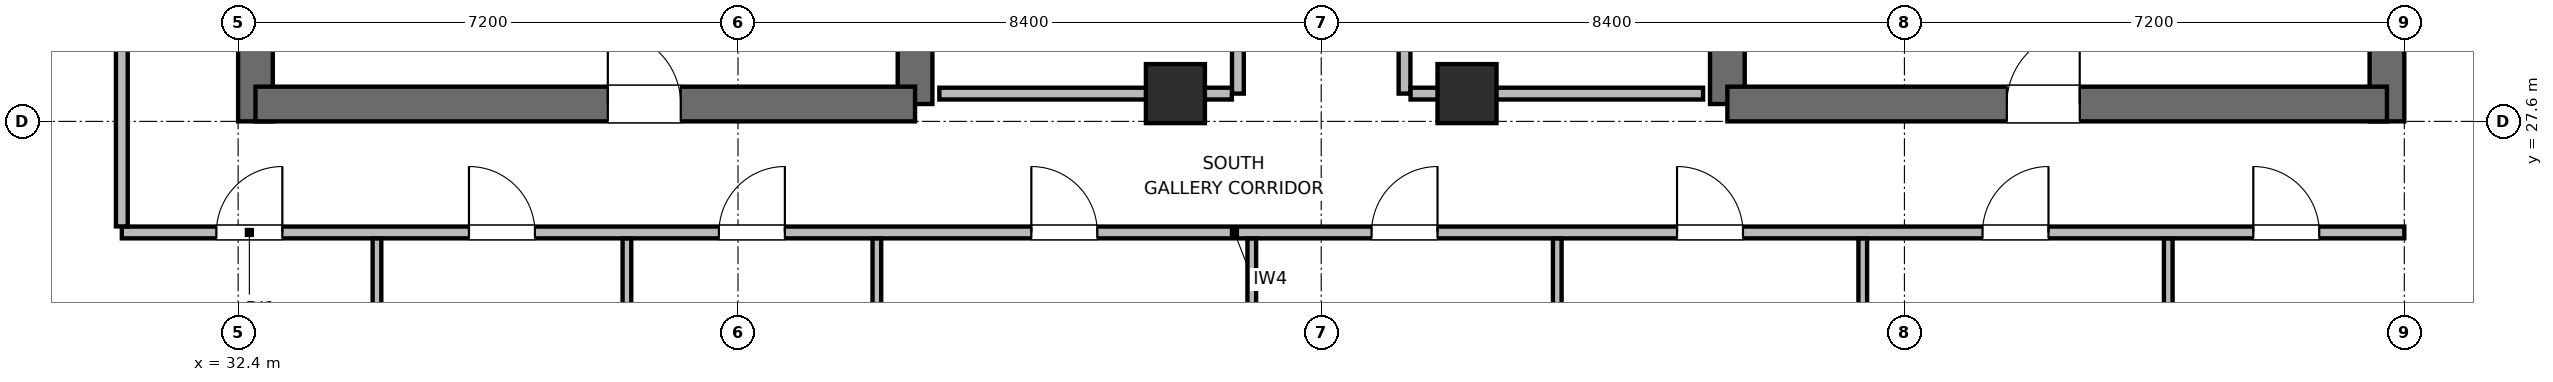
"""IFC4 building model, lengths in metres.
Left out: names, types, materials, properties, quantities, classifications, styles, units other than length and angle.
Written with IfcOpenShell. Run it as: python <this file> out.ifc"""

import sys

from ifc_helpers import new_model, si_unit, direction, frame, frame_2d, origin, origin_2d, place, context, subcontext, project, spatial, rectangle, extrude, element, fill, save


model = new_model("IFC4")
c1 = context("Model", 3, precision=1e-05, world=origin(), true_north=direction((0.0, 1.0)))
c2 = subcontext(c1, "Body", "Model", "MODEL_VIEW")
j1 = project(units=[si_unit("LENGTHUNIT", "METRE"), si_unit("PLANEANGLEUNIT", "RADIAN")], contexts=[c1])
p1 = place(None, origin())
s1 = spatial("IfcSite", under=j1, at=p1, CompositionType="ELEMENT")
p2 = place(p1, origin())
s2 = spatial("IfcBuilding", under=s1, at=p2, CompositionType="ELEMENT")
p3 = place(p2, frame((0.0, 0.0, 302.4)))
s3 = spatial("IfcBuildingStorey", under=s2, at=p3, CompositionType="ELEMENT", Elevation=302.4)
p4 = place(p3, frame((32.65, 27.6, 0.0), z_axis=(0.0, 0.0, 1.0), x_axis=(0.0, 1.0, 0.0)))
e1 = element("IfcWall", 1, at=p4, inside=s3, PredefinedType="SHEAR", context=c2, shape_type="SweptSolid", body=[
    extrude(rectangle(XDim=16.8, YDim=0.5, at=frame_2d((8.4, 0.0))), origin(), (0.0, 0.0, 1.0), 3.9),
])
p5 = place(p3, frame((42.15, 27.85, 0.0), z_axis=(0.0, 0.0, 1.0), x_axis=(0.0, 1.0, 0.0)))
e2 = element("IfcWall", 2, at=p5, inside=s3, PredefinedType="SHEAR", context=c2, shape_type="SweptSolid", body=[
    extrude(rectangle(XDim=6.55, YDim=0.5, at=frame_2d((3.275, 0.0))), origin(), (0.0, 0.0, 1.0), 3.9),
])
p6 = place(p3, frame((32.65, 27.85, 0.0), z_axis=(0.0, 0.0, 1.0), x_axis=(1.0, 0.0, 0.0)))
e3 = element("IfcWall", 3, at=p6, inside=s3, PredefinedType="SHEAR", context=c2, shape_type="SweptSolid", body=[
    extrude(rectangle(XDim=9.5, YDim=0.5, at=frame_2d((4.75, 0.0))), origin(), (0.0, 0.0, 1.0), 3.9),
])
p7 = place(p6, frame((5.075, 0.0, 0.0)))
e4 = element("IfcOpeningElement", 4, at=p7, cuts=e3, PredefinedType="OPENING", context=c2, shape_type="SweptSolid", body=[
    extrude(rectangle(XDim=1.05, YDim=2.04, at=frame_2d((0.525, 1.02))), frame((0.0, 0.26, 0.0), z_axis=(0.0, -1.0, 0.0), x_axis=(1.0, 0.0, 0.0)), (0.0, 0.0, 1.0), 0.52),
])
p8 = place(p3, frame((53.85, 27.85, 0.0), z_axis=(0.0, 0.0, 1.0), x_axis=(0.0, 1.0, 0.0)))
e5 = element("IfcWall", 5, at=p8, inside=s3, PredefinedType="SHEAR", context=c2, shape_type="SweptSolid", body=[
    extrude(rectangle(XDim=7.95, YDim=0.5, at=frame_2d((3.975, 0.0))), origin(), (0.0, 0.0, 1.0), 3.9),
])
p9 = place(p3, frame((63.35, 27.6, 0.0), z_axis=(0.0, 0.0, 1.0), x_axis=(0.0, 1.0, 0.0)))
e6 = element("IfcWall", 6, at=p9, inside=s3, PredefinedType="SHEAR", context=c2, shape_type="SweptSolid", body=[
    extrude(rectangle(XDim=16.8, YDim=0.5, at=frame_2d((8.4, 0.0))), origin(), (0.0, 0.0, 1.0), 3.9),
])
p10 = place(p3, frame((53.85, 27.85, 0.0), z_axis=(0.0, 0.0, 1.0), x_axis=(1.0, 0.0, 0.0)))
e7 = element("IfcWall", 7, at=p10, inside=s3, PredefinedType="SHEAR", context=c2, shape_type="SweptSolid", body=[
    extrude(rectangle(XDim=9.5, YDim=0.5, at=frame_2d((4.75, 0.0))), origin(), (0.0, 0.0, 1.0), 3.9),
])
p11 = place(p10, frame((4.025, 0.0, 0.0)))
e8 = element("IfcOpeningElement", 8, at=p11, cuts=e7, PredefinedType="OPENING", context=c2, shape_type="SweptSolid", body=[
    extrude(rectangle(XDim=1.05, YDim=2.04, at=frame_2d((0.525, 1.02))), frame((0.0, 0.26, 0.0), z_axis=(0.0, -1.0, 0.0), x_axis=(1.0, 0.0, 0.0)), (0.0, 0.0, 1.0), 0.52),
])
for number, where, z_axis, x_axis in (
    (9, (45.9, 28.0, 0.0), (0.0, 0.0, 1.0), (1.0, 0.0, 0.0)),
    (10, (50.1, 28.0, 0.0), (0.0, 0.0, 1.0), (1.0, 0.0, 0.0)),
):
    element("IfcColumn", number, at=place(p3, frame(where, z_axis=z_axis, x_axis=x_axis)), inside=s3, PredefinedType="COLUMN", context=c2, shape_type="SweptSolid", body=[
        extrude(rectangle(XDim=0.85, YDim=0.85, at=origin_2d()), origin(), (0.0, 0.0, 1.0), 3.9),
    ])
p12 = place(p3, frame((46.8, 28.0, 0.0), z_axis=(0.0, 0.0, 1.0), x_axis=(0.0, 1.0, 0.0)))
e11 = element("IfcWall", 11, at=p12, inside=s3, PredefinedType="PARTITIONING", context=c2, shape_type="SweptSolid", body=[
    extrude(rectangle(XDim=4.5, YDim=0.17, at=frame_2d((2.25, 0.0))), origin(), (0.0, 0.0, 1.0), 3.68),
])
p13 = place(p12, frame((0.675, 0.0, 0.0)))
e12 = element("IfcOpeningElement", 12, at=p13, cuts=e11, PredefinedType="OPENING", context=c2, shape_type="SweptSolid", body=[
    extrude(rectangle(XDim=0.9, YDim=2.02, at=frame_2d((0.45, 1.01))), frame((0.0, 0.095, 0.0), z_axis=(0.0, -1.0, 0.0), x_axis=(1.0, 0.0, 0.0)), (0.0, 0.0, 1.0), 0.19),
])
p14 = place(p12, frame((2.925, 0.0, 0.0)))
e13 = element("IfcOpeningElement", 13, at=p14, cuts=e11, PredefinedType="OPENING", context=c2, shape_type="SweptSolid", body=[
    extrude(rectangle(XDim=0.9, YDim=2.02, at=frame_2d((0.45, 1.01))), frame((0.0, 0.095, 0.0), z_axis=(0.0, -1.0, 0.0), x_axis=(1.0, 0.0, 0.0)), (0.0, 0.0, 1.0), 0.19),
])
p15 = place(p3, frame((42.5, 28.0, 0.0), z_axis=(0.0, 0.0, 1.0), x_axis=(1.0, 0.0, 0.0)))
e14 = element("IfcWall", 14, at=p15, inside=s3, PredefinedType="PARTITIONING", context=c2, shape_type="SweptSolid", body=[
    extrude(rectangle(XDim=4.213, YDim=0.17, at=frame_2d((2.106, 0.0))), origin(), (0.0, 0.0, 1.0), 2.765),
])
p16 = place(p3, frame((49.2, 28.0, 0.0), z_axis=(0.0, 0.0, 1.0), x_axis=(0.0, 1.0, 0.0)))
e15 = element("IfcWall", 15, at=p16, inside=s3, PredefinedType="PARTITIONING", context=c2, shape_type="SweptSolid", body=[
    extrude(rectangle(XDim=4.5, YDim=0.17, at=frame_2d((2.25, 0.0))), origin(), (0.0, 0.0, 1.0), 3.68),
])
p17 = place(p16, frame((1.8, 0.0, 0.0)))
e16 = element("IfcOpeningElement", 16, at=p17, cuts=e15, PredefinedType="OPENING", context=c2, shape_type="SweptSolid", body=[
    extrude(rectangle(XDim=0.9, YDim=2.02, at=frame_2d((0.45, 1.01))), frame((0.0, 0.095, 0.0), z_axis=(0.0, -1.0, 0.0), x_axis=(1.0, 0.0, 0.0)), (0.0, 0.0, 1.0), 0.19),
])
p18 = place(p3, frame((49.287, 28.0, 0.0), z_axis=(0.0, 0.0, 1.0), x_axis=(1.0, 0.0, 0.0)))
e17 = element("IfcWall", 17, at=p18, inside=s3, PredefinedType="PARTITIONING", context=c2, shape_type="SweptSolid", body=[
    extrude(rectangle(XDim=4.213, YDim=0.17, at=frame_2d((2.106, 0.0))), origin(), (0.0, 0.0, 1.0), 2.765),
])
p19 = place(p3, frame((30.725, 26.0, 0.0), z_axis=(0.0, 0.0, 1.0), x_axis=(1.0, 0.0, 0.0)))
e18 = element("IfcWall", 18, at=p19, inside=s3, PredefinedType="PARTITIONING", context=c2, shape_type="SweptSolid", body=[
    extrude(rectangle(XDim=32.875, YDim=0.17, at=frame_2d((16.438, 0.0))), origin(), (0.0, 0.0, 1.0), 3.68),
])
p20 = place(p19, frame((1.362, 0.0, 0.0)))
e19 = element("IfcOpeningElement", 19, at=p20, cuts=e18, PredefinedType="OPENING", context=c2, shape_type="SweptSolid", body=[
    extrude(rectangle(XDim=0.95, YDim=2.04, at=frame_2d((0.475, 1.02))), frame((0.0, 0.095, 0.0), z_axis=(0.0, -1.0, 0.0), x_axis=(1.0, 0.0, 0.0)), (0.0, 0.0, 1.0), 0.19),
])
p21 = place(p19, frame((5.0, 0.0, 0.0)))
e20 = element("IfcOpeningElement", 20, at=p21, cuts=e18, PredefinedType="OPENING", context=c2, shape_type="SweptSolid", body=[
    extrude(rectangle(XDim=0.95, YDim=2.04, at=frame_2d((0.475, 1.02))), frame((0.0, 0.095, 0.0), z_axis=(0.0, -1.0, 0.0), x_axis=(1.0, 0.0, 0.0)), (0.0, 0.0, 1.0), 0.19),
])
p22 = place(p19, frame((8.6, 0.0, 0.0)))
e21 = element("IfcOpeningElement", 21, at=p22, cuts=e18, PredefinedType="OPENING", context=c2, shape_type="SweptSolid", body=[
    extrude(rectangle(XDim=0.95, YDim=2.04, at=frame_2d((0.475, 1.02))), frame((0.0, 0.095, 0.0), z_axis=(0.0, -1.0, 0.0), x_axis=(1.0, 0.0, 0.0)), (0.0, 0.0, 1.0), 0.19),
])
p23 = place(p19, frame((13.1, 0.0, 0.0)))
e22 = element("IfcOpeningElement", 22, at=p23, cuts=e18, PredefinedType="OPENING", context=c2, shape_type="SweptSolid", body=[
    extrude(rectangle(XDim=0.95, YDim=2.04, at=frame_2d((0.475, 1.02))), frame((0.0, 0.095, 0.0), z_axis=(0.0, -1.0, 0.0), x_axis=(1.0, 0.0, 0.0)), (0.0, 0.0, 1.0), 0.19),
])
p24 = place(p19, frame((18.0, 0.0, 0.0)))
e23 = element("IfcOpeningElement", 23, at=p24, cuts=e18, PredefinedType="OPENING", context=c2, shape_type="SweptSolid", body=[
    extrude(rectangle(XDim=0.95, YDim=2.04, at=frame_2d((0.475, 1.02))), frame((0.0, 0.095, 0.0), z_axis=(0.0, -1.0, 0.0), x_axis=(1.0, 0.0, 0.0)), (0.0, 0.0, 1.0), 0.19),
])
p25 = place(p19, frame((22.4, 0.0, 0.0)))
e24 = element("IfcOpeningElement", 24, at=p25, cuts=e18, PredefinedType="OPENING", context=c2, shape_type="SweptSolid", body=[
    extrude(rectangle(XDim=0.95, YDim=2.04, at=frame_2d((0.475, 1.02))), frame((0.0, 0.095, 0.0), z_axis=(0.0, -1.0, 0.0), x_axis=(1.0, 0.0, 0.0)), (0.0, 0.0, 1.0), 0.19),
])
p26 = place(p19, frame((26.8, 0.0, 0.0)))
e25 = element("IfcOpeningElement", 25, at=p26, cuts=e18, PredefinedType="OPENING", context=c2, shape_type="SweptSolid", body=[
    extrude(rectangle(XDim=0.95, YDim=2.04, at=frame_2d((0.475, 1.02))), frame((0.0, 0.095, 0.0), z_axis=(0.0, -1.0, 0.0), x_axis=(1.0, 0.0, 0.0)), (0.0, 0.0, 1.0), 0.19),
])
p27 = place(p19, frame((30.7, 0.0, 0.0)))
e26 = element("IfcOpeningElement", 26, at=p27, cuts=e18, PredefinedType="OPENING", context=c2, shape_type="SweptSolid", body=[
    extrude(rectangle(XDim=0.95, YDim=2.04, at=frame_2d((0.475, 1.02))), frame((0.0, 0.095, 0.0), z_axis=(0.0, -1.0, 0.0), x_axis=(1.0, 0.0, 0.0)), (0.0, 0.0, 1.0), 0.19),
])
p28 = place(p3, frame((30.725, 26.087, 0.0), z_axis=(0.0, 0.0, 1.0), x_axis=(0.0, 1.0, 0.0)))
e27 = element("IfcWall", 27, at=p28, inside=s3, PredefinedType="PARTITIONING", context=c2, shape_type="SweptSolid", body=[
    extrude(rectangle(XDim=19.826, YDim=0.17, at=frame_2d((9.913, 0.0))), origin(), (0.0, 0.0, 1.0), 3.68),
])
p29 = place(p28, frame((3.138, 0.0, 0.0)))
e28 = element("IfcOpeningElement", 28, at=p29, cuts=e27, PredefinedType="OPENING", context=c2, shape_type="SweptSolid", body=[
    extrude(rectangle(XDim=0.95, YDim=2.04, at=frame_2d((0.475, 1.02))), frame((0.0, 0.095, 0.0), z_axis=(0.0, -1.0, 0.0), x_axis=(1.0, 0.0, 0.0)), (0.0, 0.0, 1.0), 0.19),
])
p30 = place(p28, frame((10.038, 0.0, 0.0)))
e29 = element("IfcOpeningElement", 29, at=p30, cuts=e27, PredefinedType="OPENING", context=c2, shape_type="SweptSolid", body=[
    extrude(rectangle(XDim=0.95, YDim=2.04, at=frame_2d((0.475, 1.02))), frame((0.0, 0.095, 0.0), z_axis=(0.0, -1.0, 0.0), x_axis=(1.0, 0.0, 0.0)), (0.0, 0.0, 1.0), 0.19),
])
p31 = place(p28, frame((16.338, 0.0, 0.0)))
e30 = element("IfcOpeningElement", 30, at=p31, cuts=e27, PredefinedType="OPENING", context=c2, shape_type="SweptSolid", body=[
    extrude(rectangle(XDim=0.95, YDim=2.04, at=frame_2d((0.475, 1.02))), frame((0.0, 0.095, 0.0), z_axis=(0.0, -1.0, 0.0), x_axis=(1.0, 0.0, 0.0)), (0.0, 0.0, 1.0), 0.19),
])
for number, where, z_axis, x_axis in (
    (31, (34.4, 18.875, 0.0), (0.0, 0.0, 1.0), (0.0, 1.0, 0.0)),
    (32, (38.0, 18.875, 0.0), (0.0, 0.0, 1.0), (0.0, 1.0, 0.0)),
):
    element("IfcWall", number, at=place(p3, frame(where, z_axis=z_axis, x_axis=x_axis)), inside=s3, PredefinedType="PARTITIONING", context=c2, shape_type="SweptSolid", body=[
        extrude(rectangle(XDim=7.038, YDim=0.125, at=frame_2d((3.519, 0.0))), origin(), (0.0, 0.0, 1.0), 3.68),
    ])
p32 = place(p3, frame((41.6, 18.998, 0.0), z_axis=(0.0, 0.0, 1.0), x_axis=(0.0, 1.0, 0.0)))
e33 = element("IfcWall", 33, at=p32, inside=s3, PredefinedType="PARTITIONING", context=c2, shape_type="SweptSolid", body=[
    extrude(rectangle(XDim=6.915, YDim=0.125, at=frame_2d((3.458, 0.0))), origin(), (0.0, 0.0, 1.0), 3.043),
])
p33 = place(p3, frame((47.0, 22.155, 0.0), z_axis=(0.0, 0.0, 1.0), x_axis=(0.0, 1.0, 0.0)))
e34 = element("IfcWall", 34, at=p33, inside=s3, PredefinedType="PARTITIONING", context=c2, shape_type="SweptSolid", body=[
    extrude(rectangle(XDim=3.758, YDim=0.125, at=frame_2d((1.879, 0.0))), origin(), (0.0, 0.0, 1.0), 3.68),
])
p34 = place(p3, frame((51.4, 20.075, 0.0), z_axis=(0.0, 0.0, 1.0), x_axis=(0.0, 1.0, 0.0)))
e35 = element("IfcWall", 35, at=p34, inside=s3, PredefinedType="PARTITIONING", context=c2, shape_type="SweptSolid", body=[
    extrude(rectangle(XDim=5.838, YDim=0.125, at=frame_2d((2.919, 0.0))), origin(), (0.0, 0.0, 1.0), 3.68),
])
p35 = place(p3, frame((55.8, 18.875, 0.0), z_axis=(0.0, 0.0, 1.0), x_axis=(0.0, 1.0, 0.0)))
e36 = element("IfcWall", 36, at=p35, inside=s3, PredefinedType="PARTITIONING", context=c2, shape_type="SweptSolid", body=[
    extrude(rectangle(XDim=7.038, YDim=0.125, at=frame_2d((3.519, 0.0))), origin(), (0.0, 0.0, 1.0), 3.043),
])
p36 = place(p3, frame((60.2, 18.875, 0.0), z_axis=(0.0, 0.0, 1.0), x_axis=(0.0, 1.0, 0.0)))
e37 = element("IfcWall", 37, at=p36, inside=s3, PredefinedType="PARTITIONING", context=c2, shape_type="SweptSolid", body=[
    extrude(rectangle(XDim=7.038, YDim=0.125, at=frame_2d((3.519, 0.0))), origin(), (0.0, 0.0, 1.0), 3.68),
])
p37 = place(p7, origin())
e38 = element("IfcDoor", 38, at=p37, inside=s3, OperationType="SINGLE_SWING_LEFT", PredefinedType="DOOR", context=c2, shape_type="SweptSolid", body=[
    extrude(rectangle(XDim=1.05, YDim=2.04, at=frame_2d((0.525, 1.02))), frame((0.0, 0.025, 0.0), z_axis=(0.0, -1.0, 0.0), x_axis=(1.0, 0.0, 0.0)), (0.0, 0.0, 1.0), 0.05),
])
fill(e4, e38)
p38 = place(p11, origin())
e39 = element("IfcDoor", 39, at=p38, inside=s3, OperationType="SINGLE_SWING_RIGHT", PredefinedType="DOOR", context=c2, shape_type="SweptSolid", body=[
    extrude(rectangle(XDim=1.05, YDim=2.04, at=frame_2d((0.525, 1.02))), frame((0.0, 0.025, 0.0), z_axis=(0.0, -1.0, 0.0), x_axis=(1.0, 0.0, 0.0)), (0.0, 0.0, 1.0), 0.05),
])
fill(e8, e39)
p39 = place(p20, origin())
e40 = element("IfcDoor", 40, at=p39, inside=s3, OperationType="SINGLE_SWING_RIGHT", PredefinedType="DOOR", context=c2, shape_type="SweptSolid", body=[
    extrude(rectangle(XDim=0.95, YDim=2.04, at=frame_2d((0.475, 1.02))), frame((0.0, 0.025, 0.0), z_axis=(0.0, -1.0, 0.0), x_axis=(1.0, 0.0, 0.0)), (0.0, 0.0, 1.0), 0.05),
])
fill(e19, e40)
p40 = place(p21, origin())
e41 = element("IfcDoor", 41, at=p40, inside=s3, OperationType="SINGLE_SWING_LEFT", PredefinedType="DOOR", context=c2, shape_type="SweptSolid", body=[
    extrude(rectangle(XDim=0.95, YDim=2.04, at=frame_2d((0.475, 1.02))), frame((0.0, 0.025, 0.0), z_axis=(0.0, -1.0, 0.0), x_axis=(1.0, 0.0, 0.0)), (0.0, 0.0, 1.0), 0.05),
])
fill(e20, e41)
p41 = place(p22, origin())
e42 = element("IfcDoor", 42, at=p41, inside=s3, OperationType="SINGLE_SWING_RIGHT", PredefinedType="DOOR", context=c2, shape_type="SweptSolid", body=[
    extrude(rectangle(XDim=0.95, YDim=2.04, at=frame_2d((0.475, 1.02))), frame((0.0, 0.025, 0.0), z_axis=(0.0, -1.0, 0.0), x_axis=(1.0, 0.0, 0.0)), (0.0, 0.0, 1.0), 0.05),
])
fill(e21, e42)
p42 = place(p23, origin())
e43 = element("IfcDoor", 43, at=p42, inside=s3, OperationType="SINGLE_SWING_LEFT", PredefinedType="DOOR", context=c2, shape_type="SweptSolid", body=[
    extrude(rectangle(XDim=0.95, YDim=2.04, at=frame_2d((0.475, 1.02))), frame((0.0, 0.025, 0.0), z_axis=(0.0, -1.0, 0.0), x_axis=(1.0, 0.0, 0.0)), (0.0, 0.0, 1.0), 0.05),
])
fill(e22, e43)
p43 = place(p24, origin())
e44 = element("IfcDoor", 44, at=p43, inside=s3, OperationType="SINGLE_SWING_RIGHT", PredefinedType="DOOR", context=c2, shape_type="SweptSolid", body=[
    extrude(rectangle(XDim=0.95, YDim=2.04, at=frame_2d((0.475, 1.02))), frame((0.0, 0.025, 0.0), z_axis=(0.0, -1.0, 0.0), x_axis=(1.0, 0.0, 0.0)), (0.0, 0.0, 1.0), 0.05),
])
fill(e23, e44)
p44 = place(p25, origin())
e45 = element("IfcDoor", 45, at=p44, inside=s3, OperationType="SINGLE_SWING_LEFT", PredefinedType="DOOR", context=c2, shape_type="SweptSolid", body=[
    extrude(rectangle(XDim=0.95, YDim=2.04, at=frame_2d((0.475, 1.02))), frame((0.0, 0.025, 0.0), z_axis=(0.0, -1.0, 0.0), x_axis=(1.0, 0.0, 0.0)), (0.0, 0.0, 1.0), 0.05),
])
fill(e24, e45)
p45 = place(p26, origin())
e46 = element("IfcDoor", 46, at=p45, inside=s3, OperationType="SINGLE_SWING_RIGHT", PredefinedType="DOOR", context=c2, shape_type="SweptSolid", body=[
    extrude(rectangle(XDim=0.95, YDim=2.04, at=frame_2d((0.475, 1.02))), frame((0.0, 0.025, 0.0), z_axis=(0.0, -1.0, 0.0), x_axis=(1.0, 0.0, 0.0)), (0.0, 0.0, 1.0), 0.05),
])
fill(e25, e46)
p46 = place(p27, origin())
e47 = element("IfcDoor", 47, at=p46, inside=s3, OperationType="SINGLE_SWING_LEFT", PredefinedType="DOOR", context=c2, shape_type="SweptSolid", body=[
    extrude(rectangle(XDim=0.95, YDim=2.04, at=frame_2d((0.475, 1.02))), frame((0.0, 0.025, 0.0), z_axis=(0.0, -1.0, 0.0), x_axis=(1.0, 0.0, 0.0)), (0.0, 0.0, 1.0), 0.05),
])
fill(e26, e47)
save(model, sys.argv[1])
